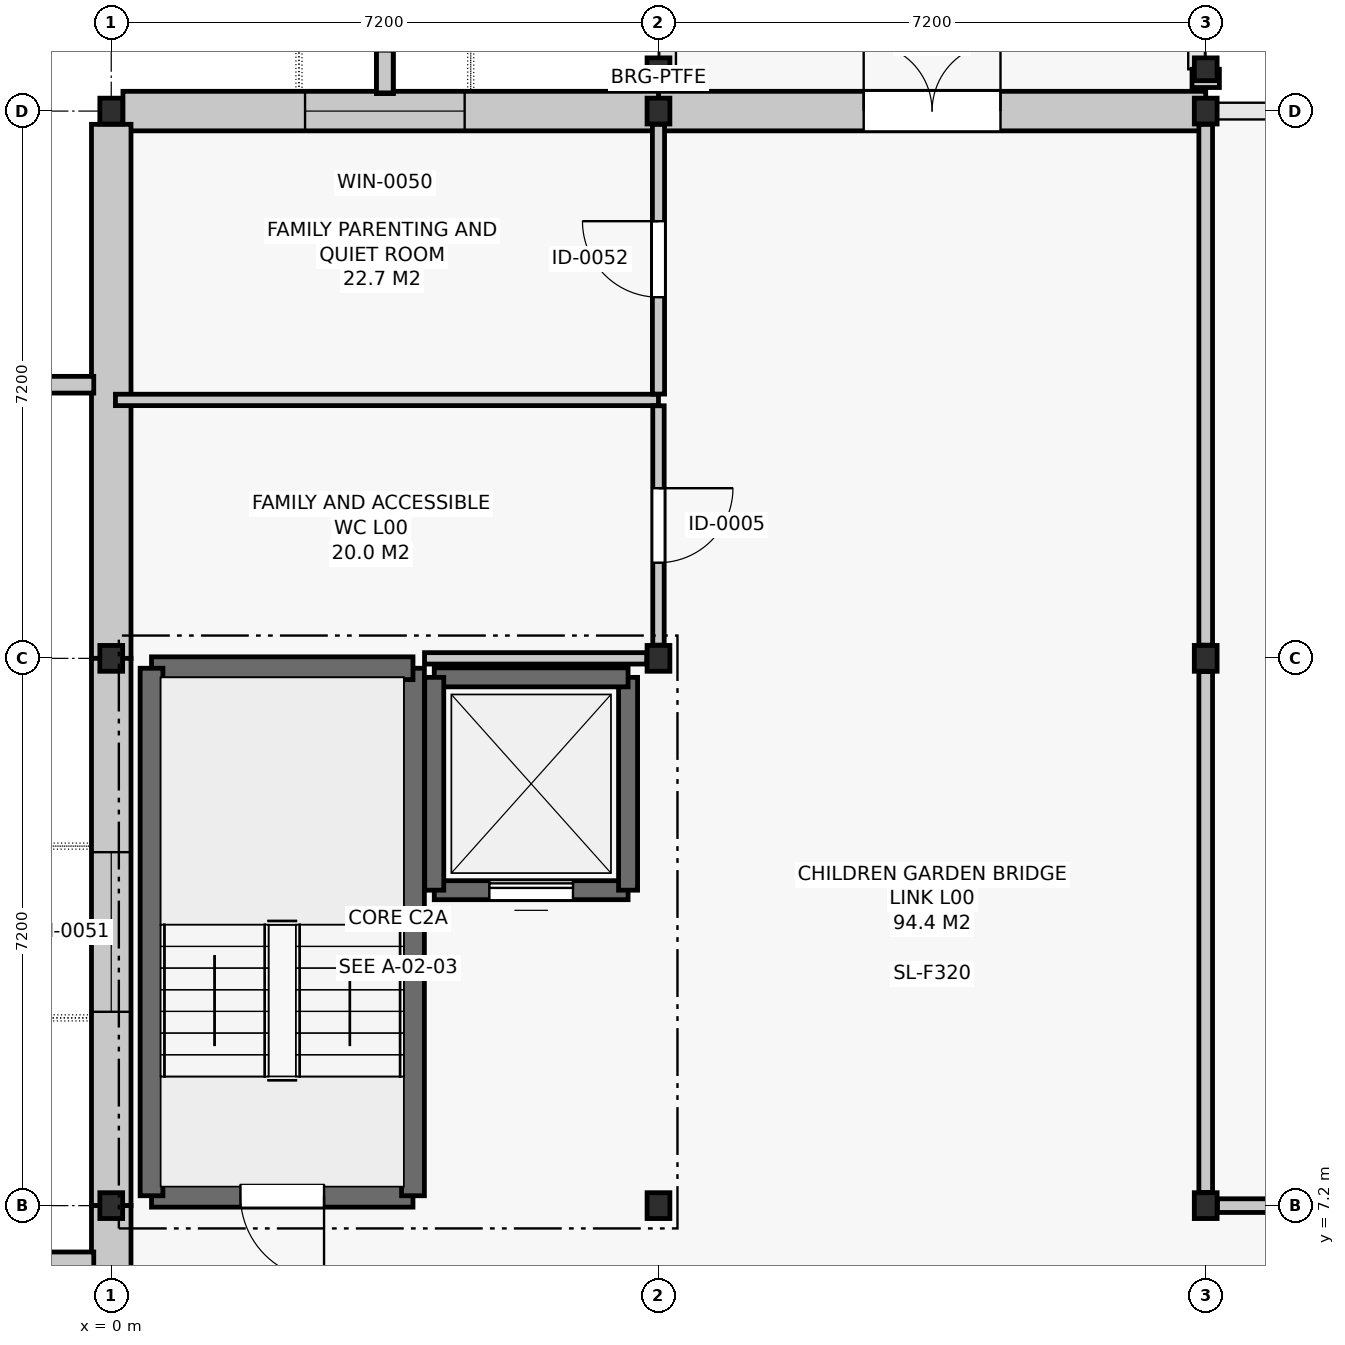
"""IFC4 building model, lengths in metres.
Left out: names, types, materials, properties, quantities, classifications, styles, units other than length and angle.
Written with IfcOpenShell. Run it as: python <this file> out.ifc"""

import sys

from ifc_helpers import new_model, si_unit, direction, frame, frame_2d, origin, origin_2d, place, context, subcontext, project, spatial, rectangle, i_section, extrude, element, fill, save


model = new_model("IFC4")
c1 = context("Model", 3, precision=1e-05, world=origin(), true_north=direction((0.0, 1.0)))
c2 = subcontext(c1, "Body", "Model", "MODEL_VIEW")
j1 = project(units=[si_unit("LENGTHUNIT", "METRE"), si_unit("PLANEANGLEUNIT", "RADIAN")], contexts=[c1])
p1 = place(None, origin())
s1 = spatial("IfcSite", under=j1, at=p1, CompositionType="ELEMENT")
p2 = place(p1, origin())
s2 = spatial("IfcBuilding", under=s1, at=p2, CompositionType="ELEMENT")
p3 = place(p2, origin())
s3 = spatial("IfcBuildingStorey", under=s2, at=p3, CompositionType="ELEMENT", Elevation=0.0)
for number, where, z_axis, x_axis in (
    (1, (0.0, 7.2, 0.0), (0.0, 0.0, 1.0), (1.0, 0.0, 0.0)),
    (2, (0.0, 14.4, 0.0), (0.0, 0.0, 1.0), (1.0, 0.0, 0.0)),
    (3, (0.0, 21.6, 0.0), (0.0, 0.0, 1.0), (1.0, 0.0, 0.0)),
    (4, (7.2, 7.2, 0.0), (0.0, 0.0, 1.0), (1.0, 0.0, 0.0)),
    (5, (7.2, 14.4, 0.0), (0.0, 0.0, 1.0), (1.0, 0.0, 0.0)),
    (6, (7.2, 21.6, 0.0), (0.0, 0.0, 1.0), (1.0, 0.0, 0.0)),
    (7, (14.4, 7.2, 0.0), (0.0, 0.0, 1.0), (1.0, 0.0, 0.0)),
    (8, (14.4, 14.4, 0.0), (0.0, 0.0, 1.0), (1.0, 0.0, 0.0)),
    (9, (14.4, 21.6, 0.0), (0.0, 0.0, 1.0), (1.0, 0.0, 0.0)),
):
    element("IfcColumn", number, at=place(p3, frame(where, z_axis=z_axis, x_axis=x_axis)), inside=s3, PredefinedType="COLUMN", context=c2, shape_type="SweptSolid", body=[
        extrude(i_section(OverallWidth=0.3, OverallDepth=0.34, WebThickness=0.012, FlangeThickness=0.021, FilletRadius=0.027, at=origin_2d()), origin(), (0.0, 0.0, 1.0), 5.4),
    ])
for number, where, z_axis, x_axis in (
    (10, (7.2, 22.15, 0.0), (0.0, 0.0, 1.0), (1.0, 0.0, 0.0)),
    (11, (14.4, 22.15, 0.0), (0.0, 0.0, 1.0), (1.0, 0.0, 0.0)),
):
    element("IfcColumn", number, at=place(p3, frame(where, z_axis=z_axis, x_axis=x_axis)), inside=s3, PredefinedType="COLUMN", context=c2, shape_type="SweptSolid", body=[
        extrude(i_section(OverallWidth=0.3, OverallDepth=0.3, WebThickness=0.011, FlangeThickness=0.019, FilletRadius=0.027, at=origin_2d()), origin(), (0.0, 0.0, 1.0), 5.4),
    ])
p4 = place(p3, frame((14.4, 21.6, 0.0), z_axis=(0.0, 0.0, 1.0), x_axis=(-1.0, 0.0, 0.0)))
e12 = element("IfcWall", 12, at=p4, inside=s3, PredefinedType="SOLIDWALL", context=c2, shape_type="SweptSolid", body=[
    extrude(rectangle(XDim=7.2, YDim=0.52, at=frame_2d((3.6, 0.0))), origin(), (0.0, 0.0, 1.0), 4.4),
])
p5 = place(p4, frame((2.7, 0.0, 0.0)))
e13 = element("IfcOpeningElement", 13, at=p5, cuts=e12, PredefinedType="OPENING", context=c2, shape_type="SweptSolid", body=[
    extrude(rectangle(XDim=1.8, YDim=2.3, at=frame_2d((0.9, 1.15))), frame((0.0, 0.272, 0.0), z_axis=(0.0, -1.0, 0.0), x_axis=(1.0, 0.0, 0.0)), (0.0, 0.0, 1.0), 0.544),
])
p6 = place(p3, frame((7.2, 21.6, 0.0), z_axis=(0.0, 0.0, 1.0), x_axis=(-1.0, 0.0, 0.0)))
e14 = element("IfcWall", 14, at=p6, inside=s3, PredefinedType="SOLIDWALL", context=c2, shape_type="SweptSolid", body=[
    extrude(rectangle(XDim=7.046, YDim=0.52, at=frame_2d((3.523, 0.0))), origin(), (0.0, 0.0, 1.0), 4.4),
])
p7 = place(p6, frame((2.55, 0.0, 0.9)))
e15 = element("IfcOpeningElement", 15, at=p7, cuts=e14, PredefinedType="OPENING", context=c2, shape_type="SweptSolid", body=[
    extrude(rectangle(XDim=2.1, YDim=2.1, at=frame_2d((1.05, 1.05))), frame((0.0, 0.272, 0.0), z_axis=(0.0, -1.0, 0.0), x_axis=(1.0, 0.0, 0.0)), (0.0, 0.0, 1.0), 0.544),
])
p8 = place(p3, frame((0.0, 21.426, 0.0), z_axis=(0.0, 0.0, 1.0), x_axis=(0.0, -1.0, 0.0)))
e16 = element("IfcWall", 16, at=p8, inside=s3, PredefinedType="SOLIDWALL", context=c2, shape_type="SweptSolid", body=[
    extrude(rectangle(XDim=7.026, YDim=0.52, at=frame_2d((3.513, 0.0))), origin(), (0.0, 0.0, 1.0), 4.4),
])
p9 = place(p3, frame((0.0, 14.4, 0.0), z_axis=(0.0, 0.0, 1.0), x_axis=(0.0, -1.0, 0.0)))
e17 = element("IfcWall", 17, at=p9, inside=s3, PredefinedType="SOLIDWALL", context=c2, shape_type="SweptSolid", body=[
    extrude(rectangle(XDim=7.2, YDim=0.52, at=frame_2d((3.6, 0.0))), origin(), (0.0, 0.0, 1.0), 4.4),
])
p10 = place(p9, frame((2.55, 0.0, 0.9)))
e18 = element("IfcOpeningElement", 18, at=p10, cuts=e17, PredefinedType="OPENING", context=c2, shape_type="SweptSolid", body=[
    extrude(rectangle(XDim=2.1, YDim=2.1, at=frame_2d((1.05, 1.05))), frame((0.0, 0.272, 0.0), z_axis=(0.0, -1.0, 0.0), x_axis=(1.0, 0.0, 0.0)), (0.0, 0.0, 1.0), 0.544),
])
p11 = place(p3, frame((0.0, 7.2, 0.0), z_axis=(0.0, 0.0, 1.0), x_axis=(0.0, -1.0, 0.0)))
e19 = element("IfcWall", 19, at=p11, inside=s3, PredefinedType="SOLIDWALL", context=c2, shape_type="SweptSolid", body=[
    extrude(rectangle(XDim=7.026, YDim=0.52, at=frame_2d((3.513, 0.0))), origin(), (0.0, 0.0, 1.0), 4.4),
])
p12 = place(p11, frame((1.5, 0.0, 0.0)))
e20 = element("IfcOpeningElement", 20, at=p12, cuts=e19, PredefinedType="OPENING", context=c2, shape_type="SweptSolid", body=[
    extrude(rectangle(XDim=1.8, YDim=2.2, at=frame_2d((0.9, 1.1))), frame((0.0, 0.272, 0.0), z_axis=(0.0, -1.0, 0.0), x_axis=(1.0, 0.0, 0.0)), (0.0, 0.0, 1.0), 0.544),
])
p13 = place(p3, frame((0.53, 7.33, 0.0), z_axis=(0.0, 0.0, 1.0), x_axis=(1.0, 0.0, 0.0)))
e21 = element("IfcWall", 21, at=p13, inside=s3, PredefinedType="SHEAR", context=c2, shape_type="SweptSolid", body=[
    extrude(rectangle(XDim=3.44, YDim=0.3, at=frame_2d((1.72, 0.0))), origin(), (0.0, 0.0, 1.0), 5.12),
])
p14 = place(p13, frame((1.17, 0.0, 0.0)))
e22 = element("IfcOpeningElement", 22, at=p14, cuts=e21, PredefinedType="OPENING", context=c2, shape_type="SweptSolid", body=[
    extrude(rectangle(XDim=1.1, YDim=2.15, at=frame_2d((0.55, 1.075))), frame((0.0, 0.162, 0.0), z_axis=(0.0, -1.0, 0.0), x_axis=(1.0, 0.0, 0.0)), (0.0, 0.0, 1.0), 0.324),
])
p15 = place(p3, frame((3.97, 7.33, 0.0), z_axis=(0.0, 0.0, 1.0), x_axis=(0.0, 1.0, 0.0)))
e23 = element("IfcWall", 23, at=p15, inside=s3, PredefinedType="SHEAR", context=c2, shape_type="SweptSolid", body=[
    extrude(rectangle(XDim=6.94, YDim=0.3, at=frame_2d((3.47, 0.0))), origin(), (0.0, 0.0, 1.0), 5.12),
])
p16 = place(p3, frame((3.97, 14.27, 0.0), z_axis=(0.0, 0.0, 1.0), x_axis=(-1.0, 0.0, 0.0)))
e24 = element("IfcWall", 24, at=p16, inside=s3, PredefinedType="SHEAR", context=c2, shape_type="SweptSolid", body=[
    extrude(rectangle(XDim=3.44, YDim=0.3, at=frame_2d((1.72, 0.0))), origin(), (0.0, 0.0, 1.0), 5.12),
])
p17 = place(p3, frame((0.53, 14.27, 0.0), z_axis=(0.0, 0.0, 1.0), x_axis=(0.0, -1.0, 0.0)))
e25 = element("IfcWall", 25, at=p17, inside=s3, PredefinedType="SHEAR", context=c2, shape_type="SweptSolid", body=[
    extrude(rectangle(XDim=6.94, YDim=0.3, at=frame_2d((3.47, 0.0))), origin(), (0.0, 0.0, 1.0), 5.12),
])
p18 = place(p3, frame((4.25, 11.35, 0.0), z_axis=(0.0, 0.0, 1.0), x_axis=(1.0, 0.0, 0.0)))
e26 = element("IfcWall", 26, at=p18, inside=s3, PredefinedType="SHEAR", context=c2, shape_type="SweptSolid", body=[
    extrude(rectangle(XDim=2.55, YDim=0.25, at=frame_2d((1.275, 0.0))), origin(), (0.0, 0.0, 1.0), 5.12),
])
p19 = place(p18, frame((0.725, 0.0, 0.0)))
e27 = element("IfcOpeningElement", 27, at=p19, cuts=e26, PredefinedType="OPENING", context=c2, shape_type="SweptSolid", body=[
    extrude(rectangle(XDim=1.1, YDim=2.1, at=frame_2d((0.55, 1.05))), frame((0.0, 0.137, 0.0), z_axis=(0.0, -1.0, 0.0), x_axis=(1.0, 0.0, 0.0)), (0.0, 0.0, 1.0), 0.274),
])
p20 = place(p3, frame((6.8, 11.35, 0.0), z_axis=(0.0, 0.0, 1.0), x_axis=(0.0, 1.0, 0.0)))
e28 = element("IfcWall", 28, at=p20, inside=s3, PredefinedType="SHEAR", context=c2, shape_type="SweptSolid", body=[
    extrude(rectangle(XDim=2.8, YDim=0.25, at=frame_2d((1.4, 0.0))), origin(), (0.0, 0.0, 1.0), 5.12),
])
p21 = place(p3, frame((6.8, 14.15, 0.0), z_axis=(0.0, 0.0, 1.0), x_axis=(-1.0, 0.0, 0.0)))
e29 = element("IfcWall", 29, at=p21, inside=s3, PredefinedType="SHEAR", context=c2, shape_type="SweptSolid", body=[
    extrude(rectangle(XDim=2.55, YDim=0.25, at=frame_2d((1.275, 0.0))), origin(), (0.0, 0.0, 1.0), 5.12),
])
p22 = place(p3, frame((4.25, 14.15, 0.0), z_axis=(0.0, 0.0, 1.0), x_axis=(0.0, -1.0, 0.0)))
e30 = element("IfcWall", 30, at=p22, inside=s3, PredefinedType="SHEAR", context=c2, shape_type="SweptSolid", body=[
    extrude(rectangle(XDim=2.8, YDim=0.25, at=frame_2d((1.4, 0.0))), origin(), (0.0, 0.0, 1.0), 5.12),
])
p23 = place(p3, frame((4.122, 14.4, 0.0), z_axis=(0.0, 0.0, 1.0), x_axis=(1.0, 0.0, 0.0)))
e31 = element("IfcWall", 31, at=p23, inside=s3, PredefinedType="PARTITIONING", context=c2, shape_type="SweptSolid", body=[
    extrude(rectangle(XDim=2.924, YDim=0.15, at=frame_2d((1.462, 0.0))), origin(), (0.0, 0.0, 1.0), 4.775),
])
p24 = place(p3, frame((0.055, 17.8, 0.0), z_axis=(0.0, 0.0, 1.0), x_axis=(1.0, 0.0, 0.0)))
e32 = element("IfcWall", 32, at=p24, inside=s3, PredefinedType="PARTITIONING", context=c2, shape_type="SweptSolid", body=[
    extrude(rectangle(XDim=7.145, YDim=0.15, at=frame_2d((3.573, 0.0))), origin(), (0.0, 0.0, 1.0), 4.555),
])
p25 = place(p3, frame((14.554, 7.2, 0.0), z_axis=(0.0, 0.0, 1.0), x_axis=(1.0, 0.0, 0.0)))
e33 = element("IfcWall", 33, at=p25, inside=s3, PredefinedType="PARTITIONING", context=c2, shape_type="SweptSolid", body=[
    extrude(rectangle(XDim=6.892, YDim=0.18, at=frame_2d((3.446, 0.0))), origin(), (0.0, 0.0, 1.0), 4.765),
])
p26 = place(p25, frame((2.671, 0.0, 0.0)))
e34 = element("IfcOpeningElement", 34, at=p26, cuts=e33, PredefinedType="OPENING", context=c2, shape_type="SweptSolid", body=[
    extrude(rectangle(XDim=1.55, YDim=2.2, at=frame_2d((0.775, 1.1))), frame((0.0, 0.102, 0.0), z_axis=(0.0, -1.0, 0.0), x_axis=(1.0, 0.0, 0.0)), (0.0, 0.0, 1.0), 0.204),
])
p27 = place(p3, frame((7.2, 14.574, 0.0), z_axis=(0.0, 0.0, 1.0), x_axis=(0.0, 1.0, 0.0)))
e35 = element("IfcWall", 35, at=p27, inside=s3, PredefinedType="PARTITIONING", context=c2, shape_type="SweptSolid", body=[
    extrude(rectangle(XDim=3.149, YDim=0.15, at=frame_2d((1.574, 0.0))), origin(), (0.0, 0.0, 1.0), 4.665),
])
p28 = place(p27, frame((1.084, 0.0, 0.0)))
e36 = element("IfcOpeningElement", 36, at=p28, cuts=e35, PredefinedType="OPENING", context=c2, shape_type="SweptSolid", body=[
    extrude(rectangle(XDim=0.98, YDim=2.1, at=frame_2d((0.49, 1.05))), frame((0.0, 0.087, 0.0), z_axis=(0.0, -1.0, 0.0), x_axis=(1.0, 0.0, 0.0)), (0.0, 0.0, 1.0), 0.174),
])
p29 = place(p3, frame((14.4, 7.374, 0.0), z_axis=(0.0, 0.0, 1.0), x_axis=(0.0, 1.0, 0.0)))
e37 = element("IfcWall", 37, at=p29, inside=s3, PredefinedType="PARTITIONING", context=c2, shape_type="SweptSolid", body=[
    extrude(rectangle(XDim=6.852, YDim=0.18, at=frame_2d((3.426, 0.0))), origin(), (0.0, 0.0, 1.0), 5.105),
])
p30 = place(p3, frame((14.4, 14.574, 0.0), z_axis=(0.0, 0.0, 1.0), x_axis=(0.0, 1.0, 0.0)))
e38 = element("IfcWall", 38, at=p30, inside=s3, PredefinedType="PARTITIONING", context=c2, shape_type="SweptSolid", body=[
    extrude(rectangle(XDim=6.852, YDim=0.18, at=frame_2d((3.426, 0.0))), origin(), (0.0, 0.0, 1.0), 4.665),
])
p31 = place(p3, frame((7.2, 17.877, 0.0), z_axis=(0.0, 0.0, 1.0), x_axis=(0.0, 1.0, 0.0)))
e39 = element("IfcWall", 39, at=p31, inside=s3, PredefinedType="PARTITIONING", context=c2, shape_type="SweptSolid", body=[
    extrude(rectangle(XDim=3.549, YDim=0.16, at=frame_2d((1.774, 0.0))), origin(), (0.0, 0.0, 1.0), 4.665),
])
p32 = place(p31, frame((1.274, 0.0, 0.0)))
e40 = element("IfcOpeningElement", 40, at=p32, cuts=e39, PredefinedType="OPENING", context=c2, shape_type="SweptSolid", body=[
    extrude(rectangle(XDim=1.0, YDim=2.15, at=frame_2d((0.5, 1.075))), frame((0.0, 0.092, 0.0), z_axis=(0.0, -1.0, 0.0), x_axis=(1.0, 0.0, 0.0)), (0.0, 0.0, 1.0), 0.184),
])
p33 = place(p5, frame((1.8, 0.0, 0.0), z_axis=(0.0, 0.0, 1.0), x_axis=(-1.0, 0.0, 0.0)))
e41 = element("IfcDoor", 41, at=p33, inside=s3, OperationType="DOUBLE_DOOR_SINGLE_SWING", PredefinedType="DOOR", context=c2, shape_type="SweptSolid", body=[
    extrude(rectangle(XDim=1.8, YDim=2.3, at=frame_2d((0.9, 1.15))), frame((0.0, 0.025, 0.0), z_axis=(0.0, -1.0, 0.0), x_axis=(1.0, 0.0, 0.0)), (0.0, 0.0, 1.0), 0.05),
])
fill(e13, e41)
p34 = place(p7, origin())
e42 = element("IfcWindow", 42, at=p34, inside=s3, PartitioningType="SINGLE_PANEL", PredefinedType="WINDOW", context=c2, shape_type="SweptSolid", body=[
    extrude(rectangle(XDim=2.1, YDim=2.1, at=frame_2d((1.05, 1.05))), frame((0.0, 0.03, 0.0), z_axis=(0.0, -1.0, 0.0), x_axis=(1.0, 0.0, 0.0)), (0.0, 0.0, 1.0), 0.06),
])
fill(e15, e42)
p35 = place(p10, origin())
e43 = element("IfcWindow", 43, at=p35, inside=s3, PartitioningType="SINGLE_PANEL", PredefinedType="WINDOW", context=c2, shape_type="SweptSolid", body=[
    extrude(rectangle(XDim=2.1, YDim=2.1, at=frame_2d((1.05, 1.05))), frame((0.0, 0.03, 0.0), z_axis=(0.0, -1.0, 0.0), x_axis=(1.0, 0.0, 0.0)), (0.0, 0.0, 1.0), 0.06),
])
fill(e18, e43)
p36 = place(p14, frame((1.1, 0.0, 0.0), z_axis=(0.0, 0.0, 1.0), x_axis=(-1.0, 0.0, 0.0)))
e44 = element("IfcDoor", 44, at=p36, inside=s3, OperationType="SINGLE_SWING_LEFT", PredefinedType="DOOR", context=c2, shape_type="SweptSolid", body=[
    extrude(rectangle(XDim=1.1, YDim=2.15, at=frame_2d((0.55, 1.075))), frame((0.0, 0.025, 0.0), z_axis=(0.0, -1.0, 0.0), x_axis=(1.0, 0.0, 0.0)), (0.0, 0.0, 1.0), 0.05),
])
fill(e22, e44)
p37 = place(p19, origin())
e45 = element("IfcDoor", 45, at=p37, inside=s3, OperationType="SLIDING_TO_LEFT", PredefinedType="DOOR", context=c2, shape_type="SweptSolid", body=[
    extrude(rectangle(XDim=1.1, YDim=2.1, at=frame_2d((0.55, 1.05))), frame((0.0, 0.025, 0.0), z_axis=(0.0, -1.0, 0.0), x_axis=(1.0, 0.0, 0.0)), (0.0, 0.0, 1.0), 0.05),
])
fill(e27, e45)
p38 = place(p28, frame((0.98, 0.0, 0.0), z_axis=(0.0, 0.0, 1.0), x_axis=(-1.0, 0.0, 0.0)))
e46 = element("IfcDoor", 46, at=p38, inside=s3, OperationType="SINGLE_SWING_LEFT", PredefinedType="DOOR", context=c2, shape_type="SweptSolid", body=[
    extrude(rectangle(XDim=0.98, YDim=2.1, at=frame_2d((0.49, 1.05))), frame((0.0, 0.025, 0.0), z_axis=(0.0, -1.0, 0.0), x_axis=(1.0, 0.0, 0.0)), (0.0, 0.0, 1.0), 0.05),
])
fill(e36, e46)
p39 = place(p32, origin())
e47 = element("IfcDoor", 47, at=p39, inside=s3, OperationType="SINGLE_SWING_RIGHT", PredefinedType="DOOR", context=c2, shape_type="SweptSolid", body=[
    extrude(rectangle(XDim=1.0, YDim=2.15, at=frame_2d((0.5, 1.075))), frame((0.0, 0.025, 0.0), z_axis=(0.0, -1.0, 0.0), x_axis=(1.0, 0.0, 0.0)), (0.0, 0.0, 1.0), 0.05),
])
fill(e40, e47)
save(model, sys.argv[1])
